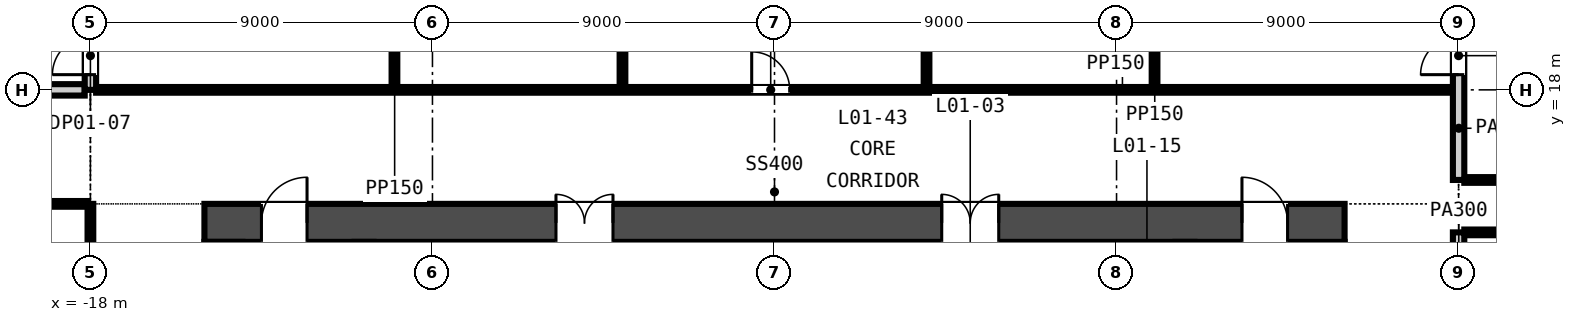
"""IFC4 building model, lengths in metres.
Left out: names, types, materials, properties, quantities, classifications, styles, units other than length and angle.
Written with IfcOpenShell. Run it as: python <this file> out.ifc"""

import sys

from ifc_helpers import new_model, si_unit, direction, frame, frame_2d, origin, place, context, subcontext, project, spatial, rectangle, extrude, element, fill, save


model = new_model("IFC4")
c1 = context("Model", 3, precision=1e-05, world=origin(), true_north=direction((0.0, 1.0)))
c2 = subcontext(c1, "Body", "Model", "MODEL_VIEW")
j1 = project(units=[si_unit("LENGTHUNIT", "METRE"), si_unit("PLANEANGLEUNIT", "RADIAN")], contexts=[c1])
p1 = place(None, origin())
s1 = spatial("IfcSite", under=j1, at=p1, CompositionType="ELEMENT")
p2 = place(p1, origin())
s2 = spatial("IfcBuilding", under=s1, at=p2, CompositionType="ELEMENT")
p3 = place(p2, frame((0.0, 0.0, 9.0)))
s3 = spatial("IfcBuildingStorey", under=s2, at=p3, CompositionType="ELEMENT", Elevation=9.0)
p4 = place(p3, frame((-15.0, 14.5, -0.4), z_axis=(0.0, 0.0, 1.0), x_axis=(1.0, 0.0, 0.0)))
e1 = element("IfcWall", 1, at=p4, inside=s3, PredefinedType="SOLIDWALL", context=c2, shape_type="SweptSolid", body=[
    extrude(rectangle(XDim=30.0, YDim=1.0, at=frame_2d((15.0, 0.0))), origin(), (0.0, 0.0, 1.0), 9.0),
])
p5 = place(p4, frame((9.25, 0.0, 0.4)))
e2 = element("IfcOpeningElement", 2, at=p5, cuts=e1, PredefinedType="OPENING", context=c2, shape_type="SweptSolid", body=[
    extrude(rectangle(XDim=1.5, YDim=2.1, at=frame_2d((0.75, 1.05))), frame((0.0, 0.51, 0.0), z_axis=(0.0, -1.0, 0.0), x_axis=(1.0, 0.0, 0.0)), (0.0, 0.0, 1.0), 1.02),
])
p6 = place(p4, frame((19.4, 0.0, 0.4)))
e3 = element("IfcOpeningElement", 3, at=p6, cuts=e1, PredefinedType="OPENING", context=c2, shape_type="SweptSolid", body=[
    extrude(rectangle(XDim=1.5, YDim=2.1, at=frame_2d((0.75, 1.05))), frame((0.0, 0.51, 0.0), z_axis=(0.0, -1.0, 0.0), x_axis=(1.0, 0.0, 0.0)), (0.0, 0.0, 1.0), 1.02),
])
p7 = place(p4, frame((1.5, 0.0, 0.4)))
e4 = element("IfcOpeningElement", 4, at=p7, cuts=e1, PredefinedType="OPENING", context=c2, shape_type="SweptSolid", body=[
    extrude(rectangle(XDim=1.2, YDim=2.1, at=frame_2d((0.6, 1.05))), frame((0.0, 0.51, 0.0), z_axis=(0.0, -1.0, 0.0), x_axis=(1.0, 0.0, 0.0)), (0.0, 0.0, 1.0), 1.02),
])
p8 = place(p4, frame((27.3, 0.0, 0.4)))
e5 = element("IfcOpeningElement", 5, at=p8, cuts=e1, PredefinedType="OPENING", context=c2, shape_type="SweptSolid", body=[
    extrude(rectangle(XDim=1.2, YDim=2.1, at=frame_2d((0.6, 1.05))), frame((0.0, 0.51, 0.0), z_axis=(0.0, -1.0, 0.0), x_axis=(1.0, 0.0, 0.0)), (0.0, 0.0, 1.0), 1.02),
])
for number, where, z_axis, x_axis in (
    (6, (-8.275, 11.3, 0.0), (0.0, 0.0, 1.0), (0.0, 1.0, 0.0)),
    (7, (-5.875, 11.3, 0.0), (0.0, 0.0, 1.0), (0.0, 1.0, 0.0)),
    (8, (-4.125, 11.3, 0.0), (0.0, 0.0, 1.0), (0.0, 1.0, 0.0)),
    (9, (-1.325, 11.3, 0.0), (0.0, 0.0, 1.0), (0.0, 1.0, 0.0)),
    (10, (1.475, 11.3, 0.0), (0.0, 0.0, 1.0), (0.0, 1.0, 0.0)),
    (11, (4.275, 11.3, 0.0), (0.0, 0.0, 1.0), (0.0, 1.0, 0.0)),
    (12, (6.025, 11.3, 0.0), (0.0, 0.0, 1.0), (0.0, 1.0, 0.0)),
    (13, (8.825, 11.3, 0.0), (0.0, 0.0, 1.0), (0.0, 1.0, 0.0)),
):
    element("IfcWall", number, at=place(p3, frame(where, z_axis=z_axis, x_axis=x_axis)), inside=s3, PredefinedType="PARTITIONING", context=c2, shape_type="SweptSolid", body=[
        extrude(rectangle(XDim=2.7, YDim=0.25, at=frame_2d((1.35, 0.0))), origin(), (0.0, 0.0, 1.0), 8.6),
    ])
p9 = place(p3, frame((18.15, 14.25, 0.0), z_axis=(0.0, 0.0, 1.0), x_axis=(1.0, 0.0, 0.0)))
e14 = element("IfcWall", 14, at=p9, inside=s3, PredefinedType="PARTITIONING", context=c2, shape_type="SweptSolid", body=[
    extrude(rectangle(XDim=5.1, YDim=0.15, at=frame_2d((2.55, 0.0))), origin(), (0.0, 0.0, 1.0), 8.6),
])
p10 = place(p3, frame((-27.035, 15.0, 0.0), z_axis=(0.0, 0.0, 1.0), x_axis=(1.0, 0.0, 0.0)))
e15 = element("IfcWall", 15, at=p10, inside=s3, PredefinedType="PARTITIONING", context=c2, shape_type="SweptSolid", body=[
    extrude(rectangle(XDim=8.96, YDim=0.15, at=frame_2d((4.48, 0.0))), origin(), (0.0, 0.0, 1.0), 8.6),
])
p11 = place(p3, frame((18.15, 15.629, 0.0), z_axis=(0.0, 0.0, 1.0), x_axis=(1.0, 0.0, 0.0)))
e16 = element("IfcWall", 16, at=p11, inside=s3, PredefinedType="PARTITIONING", context=c2, shape_type="SweptSolid", body=[
    extrude(rectangle(XDim=7.407, YDim=0.15, at=frame_2d((3.704, 0.0))), origin(), (0.0, 0.0, 1.0), 8.6),
])
p12 = place(p11, frame((2.4, 0.0, 0.0)))
e17 = element("IfcOpeningElement", 17, at=p12, cuts=e16, PredefinedType="OPENING", context=c2, shape_type="SweptSolid", body=[
    extrude(rectangle(XDim=2.4, YDim=2.4, at=frame_2d((1.2, 1.2))), frame((0.0, 0.085, 0.0), z_axis=(0.0, -1.0, 0.0), x_axis=(1.0, 0.0, 0.0)), (0.0, 0.0, 1.0), 0.17),
])
p13 = place(p3, frame((-23.5, 18.0, 0.0), z_axis=(0.0, 0.0, 1.0), x_axis=(1.0, 0.0, 0.0)))
e18 = element("IfcWall", 18, at=p13, inside=s3, PredefinedType="PARTITIONING", context=c2, shape_type="SweptSolid", body=[
    extrude(rectangle(XDim=5.35, YDim=0.3, at=frame_2d((2.675, 0.0))), origin(), (0.0, 0.0, 1.0), 8.6),
])
p14 = place(p3, frame((-17.85, 18.0, 0.0), z_axis=(0.0, 0.0, 1.0), x_axis=(1.0, 0.0, 0.0)))
e19 = element("IfcWall", 19, at=p14, inside=s3, PredefinedType="PARTITIONING", context=c2, shape_type="SweptSolid", body=[
    extrude(rectangle(XDim=35.7, YDim=0.15, at=frame_2d((17.85, 0.0))), origin(), (0.0, 0.0, 1.0), 8.6),
])
p15 = place(p14, frame((17.25, 0.0, 0.0)))
e20 = element("IfcOpeningElement", 20, at=p15, cuts=e19, PredefinedType="OPENING", context=c2, shape_type="SweptSolid", body=[
    extrude(rectangle(XDim=1.0, YDim=2.1, at=frame_2d((0.5, 1.05))), frame((0.0, 0.085, 0.0), z_axis=(0.0, -1.0, 0.0), x_axis=(1.0, 0.0, 0.0)), (0.0, 0.0, 1.0), 0.17),
])
p16 = place(p3, frame((-18.0, 1.251, 0.0), z_axis=(0.0, 0.0, 1.0), x_axis=(0.0, 1.0, 0.0)))
e21 = element("IfcWall", 21, at=p16, inside=s3, PredefinedType="PARTITIONING", context=c2, shape_type="SweptSolid", body=[
    extrude(rectangle(XDim=13.749, YDim=0.15, at=frame_2d((6.875, 0.0))), origin(), (0.0, 0.0, 1.0), 8.6),
])
p17 = place(p3, frame((-18.0, 18.0, 0.0), z_axis=(0.0, 0.0, 1.0), x_axis=(0.0, 1.0, 0.0)))
e22 = element("IfcWall", 22, at=p17, inside=s3, PredefinedType="PARTITIONING", context=c2, shape_type="SweptSolid", body=[
    extrude(rectangle(XDim=1.807, YDim=0.3, at=frame_2d((0.904, 0.0))), origin(), (0.0, 0.0, 1.0), 8.6),
])
p18 = place(p17, frame((0.4, 0.0, 0.0)))
e23 = element("IfcOpeningElement", 23, at=p18, cuts=e22, PredefinedType="OPENING", context=c2, shape_type="SweptSolid", body=[
    extrude(rectangle(XDim=1.0, YDim=2.1, at=frame_2d((0.5, 1.05))), frame((0.0, 0.16, 0.0), z_axis=(0.0, -1.0, 0.0), x_axis=(1.0, 0.0, 0.0)), (0.0, 0.0, 1.0), 0.32),
])
p19 = place(p3, frame((-10.0, 18.075, 0.0), z_axis=(0.0, 0.0, 1.0), x_axis=(0.0, 1.0, 0.0)))
e24 = element("IfcWall", 24, at=p19, inside=s3, PredefinedType="PARTITIONING", context=c2, shape_type="SweptSolid", body=[
    extrude(rectangle(XDim=13.05, YDim=0.15, at=frame_2d((6.525, 0.0))), origin(), (0.0, 0.0, 1.0), 8.6),
])
for number, where, z_axis, x_axis in (
    (25, (-4.0, 18.075, 0.0), (0.0, 0.0, 1.0), (0.0, 1.0, 0.0)),
    (26, (4.0, 18.075, 0.0), (0.0, 0.0, 1.0), (0.0, 1.0, 0.0)),
):
    element("IfcWall", number, at=place(p3, frame(where, z_axis=z_axis, x_axis=x_axis)), inside=s3, PredefinedType="PARTITIONING", context=c2, shape_type="SweptSolid", body=[
        extrude(rectangle(XDim=13.025, YDim=0.15, at=frame_2d((6.513, 0.0))), origin(), (0.0, 0.0, 1.0), 8.6),
    ])
p20 = place(p3, frame((10.0, 18.075, 0.0), z_axis=(0.0, 0.0, 1.0), x_axis=(0.0, 1.0, 0.0)))
e27 = element("IfcWall", 27, at=p20, inside=s3, PredefinedType="PARTITIONING", context=c2, shape_type="SweptSolid", body=[
    extrude(rectangle(XDim=12.125, YDim=0.15, at=frame_2d((6.062, 0.0))), origin(), (0.0, 0.0, 1.0), 8.6),
])
p21 = place(p3, frame((18.0, 13.0, 0.0), z_axis=(0.0, 0.0, 1.0), x_axis=(0.0, 1.0, 0.0)))
e28 = element("IfcWall", 28, at=p21, inside=s3, PredefinedType="PARTITIONING", context=c2, shape_type="SweptSolid", body=[
    extrude(rectangle(XDim=1.25, YDim=0.3, at=frame_2d((0.625, 0.0))), origin(), (0.0, 0.0, 1.0), 7.994),
])
p22 = place(p3, frame((18.0, 15.629, 0.0), z_axis=(0.0, 0.0, 1.0), x_axis=(0.0, 1.0, 0.0)))
e29 = element("IfcWall", 29, at=p22, inside=s3, PredefinedType="PARTITIONING", context=c2, shape_type="SweptSolid", body=[
    extrude(rectangle(XDim=4.178, YDim=0.3, at=frame_2d((2.089, 0.0))), origin(), (0.0, 0.0, 1.0), 8.6),
])
p23 = place(p22, frame((2.771, 0.0, 0.0)))
e30 = element("IfcOpeningElement", 30, at=p23, cuts=e29, PredefinedType="OPENING", context=c2, shape_type="SweptSolid", body=[
    extrude(rectangle(XDim=1.0, YDim=2.1, at=frame_2d((0.5, 1.05))), frame((0.0, 0.16, 0.0), z_axis=(0.0, -1.0, 0.0), x_axis=(1.0, 0.0, 0.0)), (0.0, 0.0, 1.0), 0.32),
])
p24 = place(p5, origin())
e31 = element("IfcDoor", 31, at=p24, inside=s3, OperationType="DOUBLE_DOOR_SINGLE_SWING", PredefinedType="DOOR", context=c2, shape_type="SweptSolid", body=[
    extrude(rectangle(XDim=1.5, YDim=2.1, at=frame_2d((0.75, 1.05))), frame((0.0, 0.025, 0.0), z_axis=(0.0, -1.0, 0.0), x_axis=(1.0, 0.0, 0.0)), (0.0, 0.0, 1.0), 0.05),
])
fill(e2, e31)
p25 = place(p6, origin())
e32 = element("IfcDoor", 32, at=p25, inside=s3, OperationType="DOUBLE_DOOR_SINGLE_SWING", PredefinedType="DOOR", context=c2, shape_type="SweptSolid", body=[
    extrude(rectangle(XDim=1.5, YDim=2.1, at=frame_2d((0.75, 1.05))), frame((0.0, 0.025, 0.0), z_axis=(0.0, -1.0, 0.0), x_axis=(1.0, 0.0, 0.0)), (0.0, 0.0, 1.0), 0.05),
])
fill(e3, e32)
p26 = place(p7, origin())
e33 = element("IfcDoor", 33, at=p26, inside=s3, OperationType="SINGLE_SWING_RIGHT", PredefinedType="DOOR", context=c2, shape_type="SweptSolid", body=[
    extrude(rectangle(XDim=1.2, YDim=2.1, at=frame_2d((0.6, 1.05))), frame((0.0, 0.025, 0.0), z_axis=(0.0, -1.0, 0.0), x_axis=(1.0, 0.0, 0.0)), (0.0, 0.0, 1.0), 0.05),
])
fill(e4, e33)
p27 = place(p8, origin())
e34 = element("IfcDoor", 34, at=p27, inside=s3, OperationType="SINGLE_SWING_LEFT", PredefinedType="DOOR", context=c2, shape_type="SweptSolid", body=[
    extrude(rectangle(XDim=1.2, YDim=2.1, at=frame_2d((0.6, 1.05))), frame((0.0, 0.025, 0.0), z_axis=(0.0, -1.0, 0.0), x_axis=(1.0, 0.0, 0.0)), (0.0, 0.0, 1.0), 0.05),
])
fill(e5, e34)
p28 = place(p18, origin())
e35 = element("IfcDoor", 35, at=p28, inside=s3, OperationType="SINGLE_SWING_LEFT", PredefinedType="DOOR", context=c2, shape_type="SweptSolid", body=[
    extrude(rectangle(XDim=1.0, YDim=2.1, at=frame_2d((0.5, 1.05))), frame((0.0, 0.025, 0.0), z_axis=(0.0, -1.0, 0.0), x_axis=(1.0, 0.0, 0.0)), (0.0, 0.0, 1.0), 0.05),
])
fill(e23, e35)
p29 = place(p23, origin())
e36 = element("IfcDoor", 36, at=p29, inside=s3, OperationType="SINGLE_SWING_LEFT", PredefinedType="DOOR", context=c2, shape_type="SweptSolid", body=[
    extrude(rectangle(XDim=1.0, YDim=2.1, at=frame_2d((0.5, 1.05))), frame((0.0, 0.025, 0.0), z_axis=(0.0, -1.0, 0.0), x_axis=(1.0, 0.0, 0.0)), (0.0, 0.0, 1.0), 0.05),
])
fill(e30, e36)
p30 = place(p15, origin())
e37 = element("IfcDoor", 37, at=p30, inside=s3, OperationType="SINGLE_SWING_LEFT", PredefinedType="DOOR", context=c2, shape_type="SweptSolid", body=[
    extrude(rectangle(XDim=1.0, YDim=2.1, at=frame_2d((0.5, 1.05))), frame((0.0, 0.025, 0.0), z_axis=(0.0, -1.0, 0.0), x_axis=(1.0, 0.0, 0.0)), (0.0, 0.0, 1.0), 0.05),
])
fill(e20, e37)
save(model, sys.argv[1])
